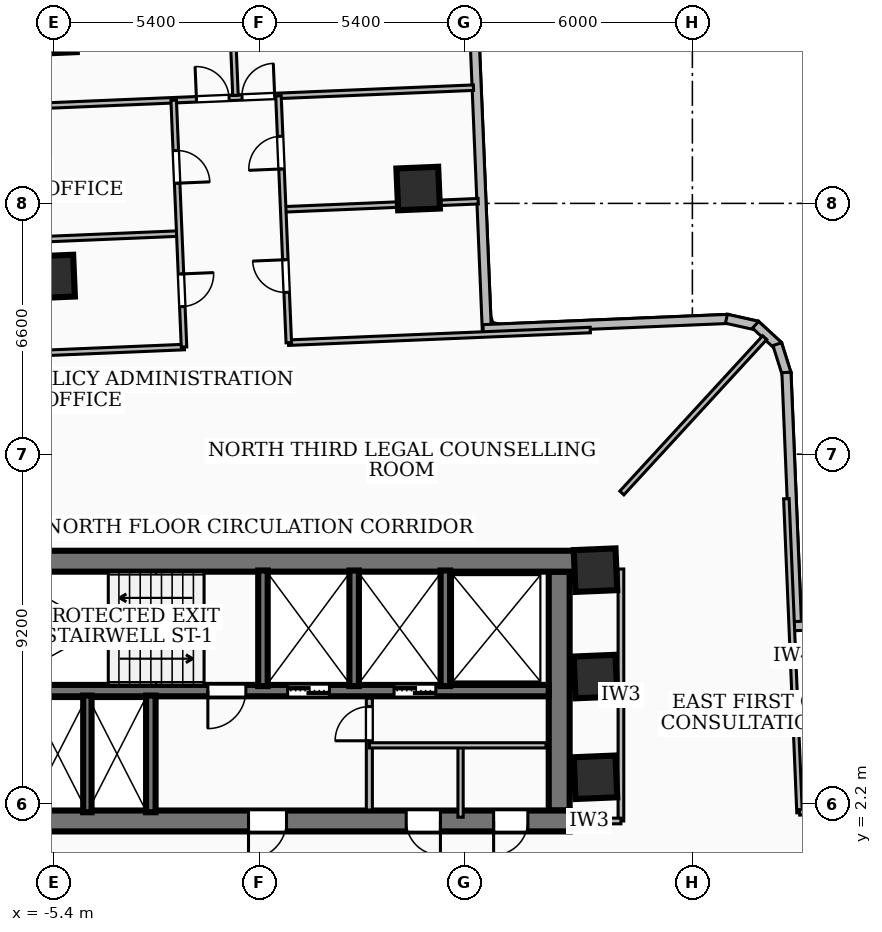
"""IFC4 building model, lengths in metres.
Left out: names, types, materials, properties, quantities, classifications, styles, units other than length and angle.
Written with IfcOpenShell. Run it as: python <this file> out.ifc"""

import sys

from ifc_helpers import new_model, si_unit, direction, frame, frame_2d, origin, origin_2d, place, context, subcontext, project, spatial, rectangle, extrude, element, fill, save


model = new_model("IFC4")
c1 = context("Model", 3, precision=1e-05, world=origin(), true_north=direction((0.0, 1.0)))
c2 = subcontext(c1, "Body", "Model", "MODEL_VIEW")
j1 = project(units=[si_unit("LENGTHUNIT", "METRE"), si_unit("PLANEANGLEUNIT", "RADIAN")], contexts=[c1])
p1 = place(None, origin())
s1 = spatial("IfcSite", under=j1, at=p1, CompositionType="ELEMENT")
p2 = place(p1, origin())
s2 = spatial("IfcBuilding", under=s1, at=p2, CompositionType="ELEMENT")
p3 = place(p2, frame((0.0, 0.0, 46.08)))
s3 = spatial("IfcBuildingStorey", under=s2, at=p3, CompositionType="ELEMENT", Elevation=46.08)
p4 = place(p3, frame((-8.78, 8.585, 0.0), z_axis=(0.0, 0.0, 1.0), x_axis=(1.0, 0.0, 0.0)))
e1 = element("IfcWall", 1, at=p4, inside=s3, PredefinedType="SHEAR", context=c2, shape_type="SweptSolid", body=[
    extrude(rectangle(XDim=17.56, YDim=0.55, at=frame_2d((8.78, 0.0))), origin(), (0.0, 0.0, 1.0), 3.32),
])
p5 = place(p3, frame((8.17, 1.75, 0.0), z_axis=(0.0, 0.0, 1.0), x_axis=(-1.0, 0.0, 0.0)))
e2 = element("IfcWall", 2, at=p5, inside=s3, PredefinedType="SHEAR", context=c2, shape_type="SweptSolid", body=[
    extrude(rectangle(XDim=16.34, YDim=0.55, at=frame_2d((8.17, 0.0))), origin(), (0.0, 0.0, 1.0), 3.32),
])
p6 = place(p5, frame((7.45, 0.0, 0.0)))
e3 = element("IfcOpeningElement", 3, at=p6, cuts=e2, PredefinedType="OPENING", context=c2, shape_type="SweptSolid", body=[
    extrude(rectangle(XDim=1.0, YDim=2.1, at=frame_2d((0.5, 1.05))), frame((0.0, 0.285, 0.0), z_axis=(0.0, -1.0, 0.0), x_axis=(1.0, 0.0, 0.0)), (0.0, 0.0, 1.0), 0.57),
])
p7 = place(p5, frame((3.4, 0.0, 0.0)))
e4 = element("IfcOpeningElement", 4, at=p7, cuts=e2, PredefinedType="OPENING", context=c2, shape_type="SweptSolid", body=[
    extrude(rectangle(XDim=0.9, YDim=2.06, at=frame_2d((0.45, 1.03))), frame((0.0, 0.285, 0.0), z_axis=(0.0, -1.0, 0.0), x_axis=(1.0, 0.0, 0.0)), (0.0, 0.0, 1.0), 0.57),
])
p8 = place(p5, frame((1.1, 0.0, 0.0)))
e5 = element("IfcOpeningElement", 5, at=p8, cuts=e2, PredefinedType="OPENING", context=c2, shape_type="SweptSolid", body=[
    extrude(rectangle(XDim=0.9, YDim=2.06, at=frame_2d((0.45, 1.03))), frame((0.0, 0.285, 0.0), z_axis=(0.0, -1.0, 0.0), x_axis=(1.0, 0.0, 0.0)), (0.0, 0.0, 1.0), 0.57),
])
p9 = place(p3, frame((7.895, 8.31, 0.0), z_axis=(0.0, 0.0, 1.0), x_axis=(0.0, -1.0, 0.0)))
e6 = element("IfcWall", 6, at=p9, inside=s3, PredefinedType="SHEAR", context=c2, shape_type="SweptSolid", body=[
    extrude(rectangle(XDim=6.285, YDim=0.55, at=frame_2d((3.143, 0.0))), origin(), (0.0, 0.0, 1.0), 3.32),
])
p10 = place(p3, frame((7.62, 5.18, 0.0), z_axis=(0.0, 0.0, 1.0), x_axis=(-1.0, 0.0, 0.0)))
e7 = element("IfcWall", 7, at=p10, inside=s3, PredefinedType="SOLIDWALL", context=c2, shape_type="SweptSolid", body=[
    extrude(rectangle(XDim=15.24, YDim=0.3, at=frame_2d((7.62, 0.0))), origin(), (0.0, 0.0, 1.0), 3.32),
])
p11 = place(p10, frame((5.77, 0.0, 0.0)))
e8 = element("IfcOpeningElement", 8, at=p11, cuts=e7, PredefinedType="OPENING", context=c2, shape_type="SweptSolid", body=[
    extrude(rectangle(XDim=1.1, YDim=2.15, at=frame_2d((0.55, 1.075))), frame((0.0, 0.16, 0.0), z_axis=(0.0, -1.0, 0.0), x_axis=(1.0, 0.0, 0.0)), (0.0, 0.0, 1.0), 0.32),
])
p12 = place(p10, frame((2.97, 0.0, 0.0)))
e9 = element("IfcOpeningElement", 9, at=p12, cuts=e7, PredefinedType="OPENING", context=c2, shape_type="SweptSolid", body=[
    extrude(rectangle(XDim=1.1, YDim=2.15, at=frame_2d((0.55, 1.075))), frame((0.0, 0.16, 0.0), z_axis=(0.0, -1.0, 0.0), x_axis=(1.0, 0.0, 0.0)), (0.0, 0.0, 1.0), 0.32),
])
p13 = place(p10, frame((7.97, 0.0, 0.0)))
e10 = element("IfcOpeningElement", 10, at=p13, cuts=e7, PredefinedType="OPENING", context=c2, shape_type="SweptSolid", body=[
    extrude(rectangle(XDim=1.0, YDim=2.1, at=frame_2d((0.5, 1.05))), frame((0.0, 0.16, 0.0), z_axis=(0.0, -1.0, 0.0), x_axis=(1.0, 0.0, 0.0)), (0.0, 0.0, 1.0), 0.32),
])
for number, where, z_axis, x_axis in (
    (11, (0.1, 5.3, 0.0), (0.0, 0.0, 1.0), (0.0, 1.0, 0.0)),
    (12, (2.5, 5.3, 0.0), (0.0, 0.0, 1.0), (0.0, 1.0, 0.0)),
    (13, (4.9, 5.3, 0.0), (0.0, 0.0, 1.0), (0.0, 1.0, 0.0)),
):
    element("IfcWall", number, at=place(p3, frame(where, z_axis=z_axis, x_axis=x_axis)), inside=s3, PredefinedType="SOLIDWALL", context=c2, shape_type="SweptSolid", body=[
        extrude(rectangle(XDim=3.04, YDim=0.25, at=frame_2d((1.52, 0.0))), origin(), (0.0, 0.0, 1.0), 3.32),
    ])
p14 = place(p3, frame((-2.85, 1.98, 0.0), z_axis=(0.0, 0.0, 1.0), x_axis=(0.0, 1.0, 0.0)))
e14 = element("IfcWall", 14, at=p14, inside=s3, PredefinedType="SOLIDWALL", context=c2, shape_type="SweptSolid", body=[
    extrude(rectangle(XDim=3.07, YDim=0.25, at=frame_2d((1.535, 0.0))), origin(), (0.0, 0.0, 1.0), 3.32),
])
p15 = place(p3, frame((-4.52, 1.98, 0.0), z_axis=(0.0, 0.0, 1.0), x_axis=(0.0, 1.0, 0.0)))
e15 = element("IfcWall", 15, at=p15, inside=s3, PredefinedType="SOLIDWALL", context=c2, shape_type="SweptSolid", body=[
    extrude(rectangle(XDim=3.07, YDim=0.22, at=frame_2d((1.535, 0.0))), origin(), (0.0, 0.0, 1.0), 3.32),
])
for number, where, z_axis, x_axis in (
    (16, (8.85, 2.9, 0.0), (0.0, 0.0, 1.0), (0.999, 0.042, 0.0)),
    (17, (8.85, 5.55, 0.0), (0.0, 0.0, 1.0), (0.999, 0.042, 0.0)),
    (18, (8.85, 8.35, 0.0), (0.0, 0.0, 1.0), (0.999, 0.042, 0.0)),
    (19, (4.184, 18.391, 0.0), (0.0, 0.0, 1.0), (0.999, 0.042, 0.0)),
    (20, (-5.421, 16.076, 0.0), (0.0, 0.0, 1.0), (0.999, 0.042, 0.0)),
    (21, (-5.372, 22.507, 0.0), (0.0, 0.0, 1.0), (0.999, 0.042, 0.0)),
):
    element("IfcColumn", number, at=place(p3, frame(where, z_axis=z_axis, x_axis=x_axis)), inside=s3, PredefinedType="COLUMN", context=c2, shape_type="SweptSolid", body=[
        extrude(rectangle(XDim=1.1, YDim=1.1, at=origin_2d()), origin(), (0.0, 0.0, 1.0), 3.6),
    ])
p16 = place(p3, frame((5.43, 28.061, 0.0), z_axis=(0.0, 0.0, 1.0), x_axis=(0.041852859621, -0.999123785195, 0.0)))
e22 = element("IfcWall", 22, at=p16, inside=s3, PredefinedType="SOLIDWALL", context=c2, shape_type="SweptSolid", body=[
    extrude(rectangle(XDim=13.475, YDim=0.24, at=frame_2d((6.737, 0.0))), origin(), (0.0, 0.0, 1.0), 2.401),
])
p17 = place(p3, frame((5.894, 14.69, 0.0), z_axis=(0.0, 0.0, 1.0), x_axis=(0.999124860845, 0.041827173477, 0.0)))
e23 = element("IfcWall", 23, at=p17, inside=s3, PredefinedType="SOLIDWALL", context=c2, shape_type="SweptSolid", body=[
    extrude(rectangle(XDim=6.456, YDim=0.24, at=frame_2d((3.228, 0.0))), origin(), (0.0, 0.0, 1.0), 2.401),
])
p18 = place(p3, frame((12.295, 14.964, 0.0), z_axis=(0.0, 0.0, 1.0), x_axis=(0.976089939158, -0.21736704137, 0.0)))
e24 = element("IfcWall", 24, at=p18, inside=s3, PredefinedType="SOLIDWALL", context=c2, shape_type="SweptSolid", body=[
    extrude(rectangle(XDim=0.829, YDim=0.24, at=frame_2d((0.415, 0.0))), origin(), (0.0, 0.0, 1.0), 3.32),
])
p19 = place(p3, frame((13.062, 14.806, 0.0), z_axis=(0.0, 0.0, 1.0), x_axis=(0.735344259965, -0.677693750404, 0.0)))
e25 = element("IfcWall", 25, at=p19, inside=s3, PredefinedType="SOLIDWALL", context=c2, shape_type="SweptSolid", body=[
    extrude(rectangle(XDim=0.813, YDim=0.24, at=frame_2d((0.406, 0.0))), origin(), (0.0, 0.0, 1.0), 3.32),
])
p20 = place(p3, frame((13.635, 14.296, 0.0), z_axis=(0.0, 0.0, 1.0), x_axis=(0.298542680168, -0.954396284631, 0.0)))
e26 = element("IfcWall", 26, at=p20, inside=s3, PredefinedType="SOLIDWALL", context=c2, shape_type="SweptSolid", body=[
    extrude(rectangle(XDim=0.831, YDim=0.24, at=frame_2d((0.416, 0.0))), origin(), (0.0, 0.0, 1.0), 3.32),
])
p21 = place(p3, frame((13.875, 13.552, 0.0), z_axis=(0.0, 0.0, 1.0), x_axis=(0.041765444226, -0.999127443157, 0.0)))
e27 = element("IfcWall", 27, at=p21, inside=s3, PredefinedType="SOLIDWALL", context=c2, shape_type="SweptSolid", body=[
    extrude(rectangle(XDim=6.775, YDim=0.24, at=frame_2d((3.387, 0.0))), origin(), (0.0, 0.0, 1.0), 2.624),
])
p22 = place(p3, frame((14.058, 6.875, 0.0), z_axis=(0.0, 0.0, 1.0), x_axis=(0.999124376175, 0.04183874918, 0.0)))
e28 = element("IfcWall", 28, at=p22, inside=s3, PredefinedType="SOLIDWALL", context=c2, shape_type="SweptSolid", body=[
    extrude(rectangle(XDim=16.876, YDim=0.24, at=frame_2d((8.438, 0.0))), origin(), (0.0, 0.0, 1.0), 2.624),
])
p23 = place(p3, frame((2.9, 2.04, 0.0), z_axis=(0.0, 0.0, 1.0), x_axis=(0.0, 1.0, 0.0)))
e29 = element("IfcWall", 29, at=p23, inside=s3, PredefinedType="PARTITIONING", context=c2, shape_type="SweptSolid", body=[
    extrude(rectangle(XDim=2.94, YDim=0.16, at=frame_2d((1.47, 0.0))), origin(), (0.0, 0.0, 1.0), 2.385),
])
p24 = place(p23, frame((1.82, 0.0, 0.0)))
e30 = element("IfcOpeningElement", 30, at=p24, cuts=e29, PredefinedType="OPENING", context=c2, shape_type="SweptSolid", body=[
    extrude(rectangle(XDim=0.9, YDim=2.06, at=frame_2d((0.45, 1.03))), frame((0.0, 0.09, 0.0), z_axis=(0.0, -1.0, 0.0), x_axis=(1.0, 0.0, 0.0)), (0.0, 0.0, 1.0), 0.18),
])
p25 = place(p3, frame((2.9, 3.74, 0.0), z_axis=(0.0, 0.0, 1.0), x_axis=(1.0, 0.0, 0.0)))
e31 = element("IfcWall", 31, at=p25, inside=s3, PredefinedType="PARTITIONING", context=c2, shape_type="SweptSolid", body=[
    extrude(rectangle(XDim=4.65, YDim=0.138, at=frame_2d((2.325, 0.0))), origin(), (0.0, 0.0, 1.0), 3.32),
])
p26 = place(p3, frame((5.3, 1.85, 0.0), z_axis=(0.0, 0.0, 1.0), x_axis=(0.0, 1.0, 0.0)))
e32 = element("IfcWall", 32, at=p26, inside=s3, PredefinedType="PARTITIONING", context=c2, shape_type="SweptSolid", body=[
    extrude(rectangle(XDim=1.89, YDim=0.138, at=frame_2d((0.945, 0.0))), origin(), (0.0, 0.0, 1.0), 2.385),
])
p27 = place(p3, frame((9.52, 1.75, 0.0), z_axis=(0.0, 0.0, 1.0), x_axis=(0.0, 1.0, 0.0)))
e33 = element("IfcWall", 33, at=p27, inside=s3, PredefinedType="PARTITIONING", context=c2, shape_type="SweptSolid", body=[
    extrude(rectangle(XDim=6.63, YDim=0.15, at=frame_2d((3.315, 0.0))), origin(), (0.0, 0.0, 1.0), 2.401),
])
p28 = place(p3, frame((7.85, 1.75, 0.0), z_axis=(0.0, 0.0, 1.0), x_axis=(1.0, 0.0, 0.0)))
e34 = element("IfcWall", 34, at=p28, inside=s3, PredefinedType="PARTITIONING", context=c2, shape_type="SweptSolid", body=[
    extrude(rectangle(XDim=1.67, YDim=0.15, at=frame_2d((0.835, 0.0))), origin(), (0.0, 0.0, 1.0), 2.385),
])
p29 = place(p3, frame((9.544, 10.38, 0.0), z_axis=(0.0, 0.0, 1.0), x_axis=(0.676856513188, 0.736114977809, 0.0)))
e35 = element("IfcWall", 35, at=p29, inside=s3, PredefinedType="PARTITIONING", context=c2, shape_type="SweptSolid", body=[
    extrude(rectangle(XDim=5.554, YDim=0.145, at=frame_2d((2.777, 0.0))), origin(), (0.0, 0.0, 1.0), 2.624),
])
p30 = place(p3, frame((14.22, 1.967, 0.0), z_axis=(0.0, 0.0, 1.0), x_axis=(-0.041948565382, 0.99911977153, 0.0)))
e36 = element("IfcWall", 36, at=p30, inside=s3, PredefinedType="PARTITIONING", context=c2, shape_type="SweptSolid", body=[
    extrude(rectangle(XDim=8.27, YDim=0.145, at=frame_2d((4.135, 0.0))), origin(), (0.0, 0.0, 1.0), 2.401),
])
p31 = place(p3, frame((21.263, 2.272, 0.0), z_axis=(0.0, 0.0, 1.0), x_axis=(-0.999124408039, -0.041837988246, 0.0)))
e37 = element("IfcWall", 37, at=p31, inside=s3, PredefinedType="PARTITIONING", context=c2, shape_type="SweptSolid", body=[
    extrude(rectangle(XDim=7.049, YDim=0.145, at=frame_2d((3.524, 0.0))), origin(), (0.0, 0.0, 1.0), 3.32),
])
p32 = place(p31, frame((3.074, 0.0, 0.0)))
e38 = element("IfcOpeningElement", 38, at=p32, cuts=e37, PredefinedType="OPENING", context=c2, shape_type="SweptSolid", body=[
    extrude(rectangle(XDim=0.9, YDim=2.06, at=frame_2d((0.45, 1.03))), frame((0.0, 0.083, 0.0), z_axis=(0.0, -1.0, 0.0), x_axis=(1.0, 0.0, 0.0)), (0.0, 0.0, 1.0), 0.165),
])
p33 = place(p3, frame((-1.967, 14.22, 0.0), z_axis=(0.0, 0.0, 1.0), x_axis=(-0.99911977153, -0.041948565382, 0.0)))
e39 = element("IfcWall", 39, at=p33, inside=s3, PredefinedType="PARTITIONING", context=c2, shape_type="SweptSolid", body=[
    extrude(rectangle(XDim=8.27, YDim=0.145, at=frame_2d((4.135, 0.0))), origin(), (0.0, 0.0, 1.0), 2.401),
])
p34 = place(p3, frame((8.714, 14.668, 0.0), z_axis=(0.0, 0.0, 1.0), x_axis=(-0.999122557945, -0.041882146625, 0.0)))
e40 = element("IfcWall", 40, at=p34, inside=s3, PredefinedType="PARTITIONING", context=c2, shape_type="SweptSolid", body=[
    extrude(rectangle(XDim=7.951, YDim=0.145, at=frame_2d((3.976, 0.0))), origin(), (0.0, 0.0, 1.0), 2.401),
])
p35 = place(p3, frame((-2.122, 17.206, 0.0), z_axis=(0.0, 0.0, 1.0), x_axis=(-0.999119609111, -0.041952433648, 0.0)))
e41 = element("IfcWall", 41, at=p35, inside=s3, PredefinedType="PARTITIONING", context=c2, shape_type="SweptSolid", body=[
    extrude(rectangle(XDim=4.795, YDim=0.145, at=frame_2d((2.397, 0.0))), origin(), (0.0, 0.0, 1.0), 2.401),
])
p36 = place(p3, frame((5.764, 18.057, 0.0), z_axis=(0.0, 0.0, 1.0), x_axis=(-0.999125612634, -0.041809211649, 0.0)))
e42 = element("IfcWall", 42, at=p36, inside=s3, PredefinedType="PARTITIONING", context=c2, shape_type="SweptSolid", body=[
    extrude(rectangle(XDim=5.115, YDim=0.145, at=frame_2d((2.558, 0.0))), origin(), (0.0, 0.0, 1.0), 2.401),
])
p37 = place(p3, frame((-2.249, 20.714, 0.0), z_axis=(0.0, 0.0, 1.0), x_axis=(0.041843020894, -0.999124197286, 0.0)))
e43 = element("IfcWall", 43, at=p37, inside=s3, PredefinedType="PARTITIONING", context=c2, shape_type="SweptSolid", body=[
    extrude(rectangle(XDim=6.5, YDim=0.145, at=frame_2d((3.25, 0.0))), origin(), (0.0, 0.0, 1.0), 3.32),
])
p38 = place(p37, frame((4.575, 0.0, 0.0)))
e44 = element("IfcOpeningElement", 44, at=p38, cuts=e43, PredefinedType="OPENING", context=c2, shape_type="SweptSolid", body=[
    extrude(rectangle(XDim=0.86, YDim=2.04, at=frame_2d((0.43, 1.02))), frame((0.0, 0.083, 0.0), z_axis=(0.0, -1.0, 0.0), x_axis=(1.0, 0.0, 0.0)), (0.0, 0.0, 1.0), 0.165),
])
p39 = place(p37, frame((1.325, 0.0, 0.0)))
e45 = element("IfcOpeningElement", 45, at=p39, cuts=e43, PredefinedType="OPENING", context=c2, shape_type="SweptSolid", body=[
    extrude(rectangle(XDim=0.86, YDim=2.04, at=frame_2d((0.43, 1.02))), frame((0.0, 0.083, 0.0), z_axis=(0.0, -1.0, 0.0), x_axis=(1.0, 0.0, 0.0)), (0.0, 0.0, 1.0), 0.165),
])
p40 = place(p3, frame((0.78, 14.335, 0.0), z_axis=(0.0, 0.0, 1.0), x_axis=(-0.041836740669, 0.99912446028, 0.0)))
e46 = element("IfcWall", 46, at=p40, inside=s3, PredefinedType="PARTITIONING", context=c2, shape_type="SweptSolid", body=[
    extrude(rectangle(XDim=6.501, YDim=0.145, at=frame_2d((3.25, 0.0))), origin(), (0.0, 0.0, 1.0), 3.32),
])
p41 = place(p40, frame((1.325, 0.0, 0.0)))
e47 = element("IfcOpeningElement", 47, at=p41, cuts=e46, PredefinedType="OPENING", context=c2, shape_type="SweptSolid", body=[
    extrude(rectangle(XDim=0.86, YDim=2.04, at=frame_2d((0.43, 1.02))), frame((0.0, 0.083, 0.0), z_axis=(0.0, -1.0, 0.0), x_axis=(1.0, 0.0, 0.0)), (0.0, 0.0, 1.0), 0.165),
])
p42 = place(p40, frame((4.575, 0.0, 0.0)))
e48 = element("IfcOpeningElement", 48, at=p42, cuts=e46, PredefinedType="OPENING", context=c2, shape_type="SweptSolid", body=[
    extrude(rectangle(XDim=0.86, YDim=2.04, at=frame_2d((0.43, 1.02))), frame((0.0, 0.083, 0.0), z_axis=(0.0, -1.0, 0.0), x_axis=(1.0, 0.0, 0.0)), (0.0, 0.0, 1.0), 0.165),
])
p43 = place(p3, frame((-0.623, 20.842, 0.0), z_axis=(0.0, 0.0, 1.0), x_axis=(-0.041805771438, 0.999125756586, 0.0)))
e49 = element("IfcWall", 49, at=p43, inside=s3, PredefinedType="PARTITIONING", context=c2, shape_type="SweptSolid", body=[
    extrude(rectangle(XDim=8.345, YDim=0.145, at=frame_2d((4.173, 0.0))), origin(), (0.0, 0.0, 1.0), 2.812),
])
p44 = place(p3, frame((-7.06, 20.512, 0.0), z_axis=(0.0, 0.0, 1.0), x_axis=(0.99912047737, 0.041931750497, 0.0)))
e50 = element("IfcWall", 50, at=p44, inside=s3, PredefinedType="PARTITIONING", context=c2, shape_type="SweptSolid", body=[
    extrude(rectangle(XDim=12.71, YDim=0.145, at=frame_2d((6.355, 0.0))), origin(), (0.0, 0.0, 1.0), 2.401),
])
p45 = place(p44, frame((6.615, 0.0, 0.0)))
e51 = element("IfcOpeningElement", 51, at=p45, cuts=e50, PredefinedType="OPENING", context=c2, shape_type="SweptSolid", body=[
    extrude(rectangle(XDim=0.86, YDim=2.04, at=frame_2d((0.43, 1.02))), frame((0.0, 0.083, 0.0), z_axis=(0.0, -1.0, 0.0), x_axis=(1.0, 0.0, 0.0)), (0.0, 0.0, 1.0), 0.165),
])
p46 = place(p44, frame((5.415, 0.0, 0.0)))
e52 = element("IfcOpeningElement", 52, at=p46, cuts=e50, PredefinedType="OPENING", context=c2, shape_type="SweptSolid", body=[
    extrude(rectangle(XDim=0.86, YDim=2.04, at=frame_2d((0.43, 1.02))), frame((0.0, 0.083, 0.0), z_axis=(0.0, -1.0, 0.0), x_axis=(1.0, 0.0, 0.0)), (0.0, 0.0, 1.0), 0.165),
])
p47 = place(p6, origin())
e53 = element("IfcDoor", 53, at=p47, inside=s3, OperationType="SINGLE_SWING_RIGHT", PredefinedType="DOOR", context=c2, shape_type="SweptSolid", body=[
    extrude(rectangle(XDim=1.0, YDim=2.1, at=frame_2d((0.5, 1.05))), frame((0.0, 0.025, 0.0), z_axis=(0.0, -1.0, 0.0), x_axis=(1.0, 0.0, 0.0)), (0.0, 0.0, 1.0), 0.05),
])
fill(e3, e53)
p48 = place(p11, origin())
e54 = element("IfcDoor", 54, at=p48, inside=s3, OperationType="DOUBLE_DOOR_SLIDING", PredefinedType="DOOR", context=c2, shape_type="SweptSolid", body=[
    extrude(rectangle(XDim=1.1, YDim=2.15, at=frame_2d((0.55, 1.075))), frame((0.0, 0.025, 0.0), z_axis=(0.0, -1.0, 0.0), x_axis=(1.0, 0.0, 0.0)), (0.0, 0.0, 1.0), 0.05),
])
fill(e8, e54)
p49 = place(p12, origin())
e55 = element("IfcDoor", 55, at=p49, inside=s3, OperationType="DOUBLE_DOOR_SLIDING", PredefinedType="DOOR", context=c2, shape_type="SweptSolid", body=[
    extrude(rectangle(XDim=1.1, YDim=2.15, at=frame_2d((0.55, 1.075))), frame((0.0, 0.025, 0.0), z_axis=(0.0, -1.0, 0.0), x_axis=(1.0, 0.0, 0.0)), (0.0, 0.0, 1.0), 0.05),
])
fill(e9, e55)
p50 = place(p13, origin())
e56 = element("IfcDoor", 56, at=p50, inside=s3, OperationType="SINGLE_SWING_RIGHT", PredefinedType="DOOR", context=c2, shape_type="SweptSolid", body=[
    extrude(rectangle(XDim=1.0, YDim=2.1, at=frame_2d((0.5, 1.05))), frame((0.0, 0.025, 0.0), z_axis=(0.0, -1.0, 0.0), x_axis=(1.0, 0.0, 0.0)), (0.0, 0.0, 1.0), 0.05),
])
fill(e10, e56)
p51 = place(p7, origin())
e57 = element("IfcDoor", 57, at=p51, inside=s3, OperationType="SINGLE_SWING_LEFT", PredefinedType="DOOR", context=c2, shape_type="SweptSolid", body=[
    extrude(rectangle(XDim=0.9, YDim=2.06, at=frame_2d((0.45, 1.03))), frame((0.0, 0.025, 0.0), z_axis=(0.0, -1.0, 0.0), x_axis=(1.0, 0.0, 0.0)), (0.0, 0.0, 1.0), 0.05),
])
fill(e4, e57)
p52 = place(p8, origin())
e58 = element("IfcDoor", 58, at=p52, inside=s3, OperationType="SINGLE_SWING_RIGHT", PredefinedType="DOOR", context=c2, shape_type="SweptSolid", body=[
    extrude(rectangle(XDim=0.9, YDim=2.06, at=frame_2d((0.45, 1.03))), frame((0.0, 0.025, 0.0), z_axis=(0.0, -1.0, 0.0), x_axis=(1.0, 0.0, 0.0)), (0.0, 0.0, 1.0), 0.05),
])
fill(e5, e58)
p53 = place(p24, origin())
e59 = element("IfcDoor", 59, at=p53, inside=s3, OperationType="SINGLE_SWING_LEFT", PredefinedType="DOOR", context=c2, shape_type="SweptSolid", body=[
    extrude(rectangle(XDim=0.9, YDim=2.06, at=frame_2d((0.45, 1.03))), frame((0.0, 0.025, 0.0), z_axis=(0.0, -1.0, 0.0), x_axis=(1.0, 0.0, 0.0)), (0.0, 0.0, 1.0), 0.05),
])
fill(e30, e59)
p54 = place(p38, origin())
e60 = element("IfcDoor", 60, at=p54, inside=s3, OperationType="SINGLE_SWING_LEFT", PredefinedType="DOOR", context=c2, shape_type="SweptSolid", body=[
    extrude(rectangle(XDim=0.86, YDim=2.04, at=frame_2d((0.43, 1.02))), frame((0.0, 0.025, 0.0), z_axis=(0.0, -1.0, 0.0), x_axis=(1.0, 0.0, 0.0)), (0.0, 0.0, 1.0), 0.05),
])
fill(e44, e60)
p55 = place(p39, origin())
e61 = element("IfcDoor", 61, at=p55, inside=s3, OperationType="SINGLE_SWING_RIGHT", PredefinedType="DOOR", context=c2, shape_type="SweptSolid", body=[
    extrude(rectangle(XDim=0.86, YDim=2.04, at=frame_2d((0.43, 1.02))), frame((0.0, 0.025, 0.0), z_axis=(0.0, -1.0, 0.0), x_axis=(1.0, 0.0, 0.0)), (0.0, 0.0, 1.0), 0.05),
])
fill(e45, e61)
p56 = place(p41, origin())
e62 = element("IfcDoor", 62, at=p56, inside=s3, OperationType="SINGLE_SWING_RIGHT", PredefinedType="DOOR", context=c2, shape_type="SweptSolid", body=[
    extrude(rectangle(XDim=0.86, YDim=2.04, at=frame_2d((0.43, 1.02))), frame((0.0, 0.025, 0.0), z_axis=(0.0, -1.0, 0.0), x_axis=(1.0, 0.0, 0.0)), (0.0, 0.0, 1.0), 0.05),
])
fill(e47, e62)
p57 = place(p42, origin())
e63 = element("IfcDoor", 63, at=p57, inside=s3, OperationType="SINGLE_SWING_LEFT", PredefinedType="DOOR", context=c2, shape_type="SweptSolid", body=[
    extrude(rectangle(XDim=0.86, YDim=2.04, at=frame_2d((0.43, 1.02))), frame((0.0, 0.025, 0.0), z_axis=(0.0, -1.0, 0.0), x_axis=(1.0, 0.0, 0.0)), (0.0, 0.0, 1.0), 0.05),
])
fill(e48, e63)
p58 = place(p45, origin())
e64 = element("IfcDoor", 64, at=p58, inside=s3, OperationType="SINGLE_SWING_RIGHT", PredefinedType="DOOR", context=c2, shape_type="SweptSolid", body=[
    extrude(rectangle(XDim=0.86, YDim=2.04, at=frame_2d((0.43, 1.02))), frame((0.0, 0.025, 0.0), z_axis=(0.0, -1.0, 0.0), x_axis=(1.0, 0.0, 0.0)), (0.0, 0.0, 1.0), 0.05),
])
fill(e51, e64)
p59 = place(p46, origin())
e65 = element("IfcDoor", 65, at=p59, inside=s3, OperationType="SINGLE_SWING_LEFT", PredefinedType="DOOR", context=c2, shape_type="SweptSolid", body=[
    extrude(rectangle(XDim=0.86, YDim=2.04, at=frame_2d((0.43, 1.02))), frame((0.0, 0.025, 0.0), z_axis=(0.0, -1.0, 0.0), x_axis=(1.0, 0.0, 0.0)), (0.0, 0.0, 1.0), 0.05),
])
fill(e52, e65)
save(model, sys.argv[1])
